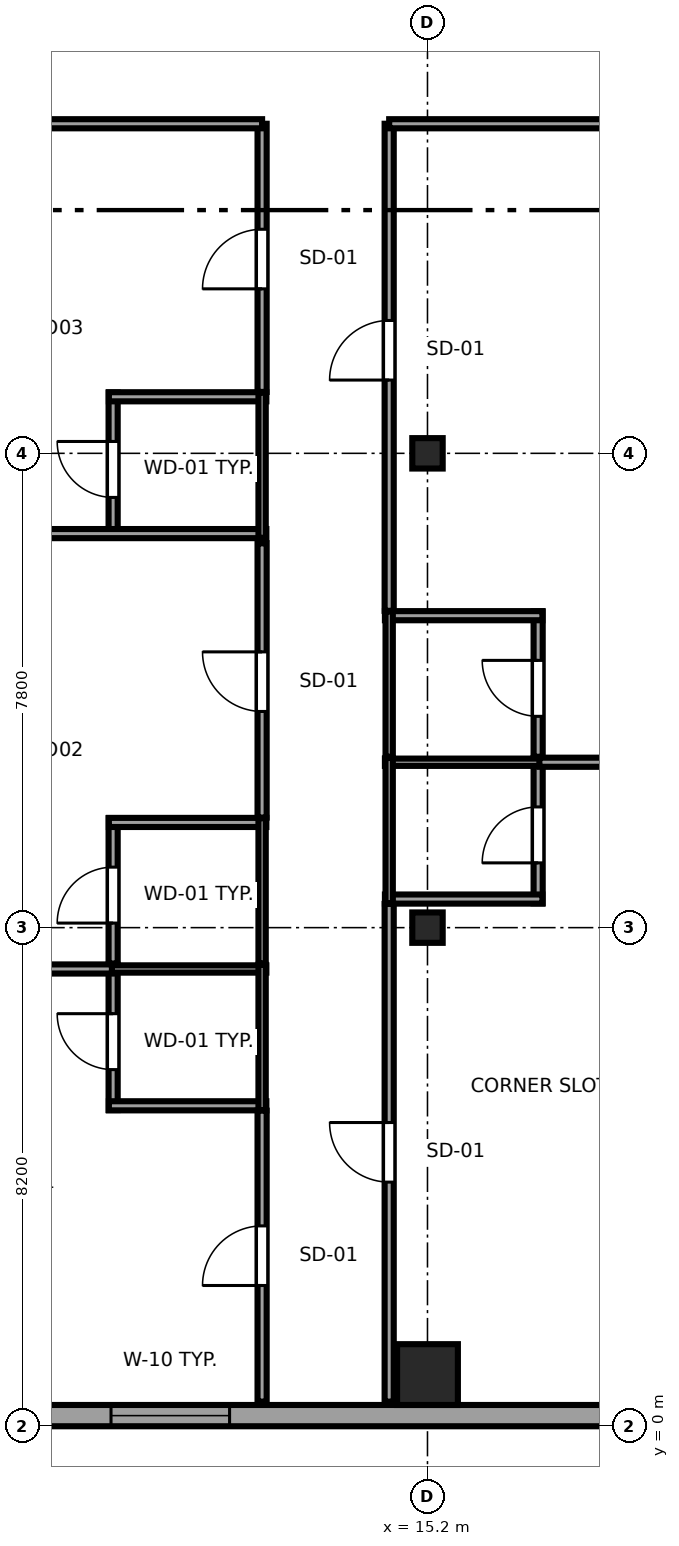
"""IFC4 building model, lengths in metres.
Left out: names, types, materials, properties, quantities, classifications, styles, units other than length and angle.
Written with IfcOpenShell. Run it as: python <this file> out.ifc"""

import sys

from ifc_helpers import new_model, si_unit, direction, frame, frame_2d, origin, origin_2d, place, context, subcontext, project, spatial, rectangle, i_section, extrude, source, transform, mapped, element, fill, save


model = new_model("IFC4")
c1 = context("Model", 3, precision=1e-05, world=origin(), true_north=direction((0.0, 1.0)))
c2 = subcontext(c1, "Body", "Model", "MODEL_VIEW")
j1 = project(units=[si_unit("LENGTHUNIT", "METRE"), si_unit("PLANEANGLEUNIT", "RADIAN")], contexts=[c1])
p1 = place(None, origin())
s1 = spatial("IfcSite", under=j1, at=p1, CompositionType="ELEMENT")
p2 = place(p1, origin())
s2 = spatial("IfcBuilding", under=s1, at=p2, CompositionType="ELEMENT")
p3 = place(p2, frame((0.0, 0.0, 56.85)))
s3 = spatial("IfcBuildingStorey", under=s2, at=p3, CompositionType="ELEMENT", Elevation=56.85)
m1 = source(origin(), c2, "Body", "SweptSolid", [
    extrude(rectangle(XDim=1.0, YDim=1.0, at=origin_2d()), origin(), (0.0, 0.0, 1.0), 3.55),
])
p4 = place(p3, frame((15.2, 0.85, 0.0), z_axis=(0.0, 0.0, 1.0), x_axis=(1.0, 0.0, 0.0)))
e1 = element("IfcColumn", 1, at=p4, inside=s3, PredefinedType="COLUMN", context=c2, shape_type="MappedRepresentation", body=[
    mapped(m1, transform((0.0, 0.0, 0.0), x_axis=(1.0, 0.0, 0.0), y_axis=(0.0, 1.0, 0.0), z_axis=(0.0, 0.0, 1.0), scale=1.0)),
])
m2 = source(origin(), c2, "Body", "SweptSolid", [
    extrude(i_section(OverallWidth=0.5, OverallDepth=0.5, WebThickness=0.028, FlangeThickness=0.045, at=origin_2d()), origin(), (0.0, 0.0, 1.0), 3.55),
])
for number, where, z_axis, x_axis in (
    (2, (15.2, 8.2, 0.0), (0.0, 0.0, 1.0), (1.0, 0.0, 0.0)),
    (3, (15.2, 16.0, 0.0), (0.0, 0.0, 1.0), (1.0, 0.0, 0.0)),
):
    element("IfcColumn", number, at=place(p3, frame(where, z_axis=z_axis, x_axis=x_axis)), inside=s3, PredefinedType="COLUMN", context=c2, shape_type="MappedRepresentation", body=[
        mapped(m2, transform((0.0, 0.0, 0.0), x_axis=(1.0, 0.0, 0.0), y_axis=(0.0, 1.0, 0.0), z_axis=(0.0, 0.0, 1.0), scale=1.0)),
    ])
p5 = place(p3, frame((4.617, 0.175, 0.0), z_axis=(0.0, 0.0, 1.0), x_axis=(1.0, 0.0, 0.0)))
e4 = element("IfcWall", 4, at=p5, inside=s3, PredefinedType="SOLIDWALL", context=c2, shape_type="SweptSolid", body=[
    extrude(rectangle(XDim=18.008, YDim=0.35, at=frame_2d((9.004, 0.0))), origin(), (0.0, 0.0, 1.0), 3.37),
])
p6 = place(p5, frame((5.378, 0.0, 0.68)))
e5 = element("IfcOpeningElement", 5, at=p6, cuts=e4, PredefinedType="OPENING", context=c2, shape_type="SweptSolid", body=[
    extrude(rectangle(XDim=1.95, YDim=1.82, at=frame_2d((0.975, 0.91))), frame((0.0, 0.185, 0.0), z_axis=(0.0, -1.0, 0.0), x_axis=(1.0, 0.0, 0.0)), (0.0, 0.0, 1.0), 0.37),
])
p7 = place(p5, frame((14.332, 0.0, 0.68)))
e6 = element("IfcOpeningElement", 6, at=p7, cuts=e4, PredefinedType="OPENING", context=c2, shape_type="SweptSolid", body=[
    extrude(rectangle(XDim=1.95, YDim=1.82, at=frame_2d((0.975, 0.91))), frame((0.0, 0.185, 0.0), z_axis=(0.0, -1.0, 0.0), x_axis=(1.0, 0.0, 0.0)), (0.0, 0.0, 1.0), 0.37),
])
p8 = place(p3, frame((10.03, 5.2, 0.0), z_axis=(0.0, 0.0, 1.0), x_axis=(0.0, 1.0, 0.0)))
e7 = element("IfcWall", 7, at=p8, inside=s3, PredefinedType="PARTITIONING", context=c2, shape_type="SweptSolid", body=[
    extrude(rectangle(XDim=2.39, YDim=0.15, at=frame_2d((1.195, 0.0))), origin(), (0.0, 0.0, 1.0), 3.37),
])
p9 = place(p8, frame((0.665, 0.0, 0.0)))
e8 = element("IfcOpeningElement", 8, at=p9, cuts=e7, PredefinedType="OPENING", context=c2, shape_type="SweptSolid", body=[
    extrude(rectangle(XDim=0.92, YDim=2.01, at=frame_2d((0.46, 1.005))), frame((0.0, 0.085, 0.0), z_axis=(0.0, -1.0, 0.0), x_axis=(1.0, 0.0, 0.0)), (0.0, 0.0, 1.0), 0.17),
])
p10 = place(p3, frame((9.96, 5.27, 0.0), z_axis=(0.0, 0.0, 1.0), x_axis=(1.0, 0.0, 0.0)))
e9 = element("IfcWall", 9, at=p10, inside=s3, PredefinedType="PARTITIONING", context=c2, shape_type="SweptSolid", body=[
    extrude(rectangle(XDim=2.59, YDim=0.15, at=frame_2d((1.295, 0.0))), origin(), (0.0, 0.0, 1.0), 3.37),
])
p11 = place(p3, frame((9.96, 7.52, 0.0), z_axis=(0.0, 0.0, 1.0), x_axis=(1.0, 0.0, 0.0)))
e10 = element("IfcWall", 10, at=p11, inside=s3, PredefinedType="PLUMBINGWALL", context=c2, shape_type="SweptSolid", body=[
    extrude(rectangle(XDim=2.59, YDim=0.12, at=frame_2d((1.295, 0.0))), origin(), (0.0, 0.0, 1.0), 3.37),
])
p12 = place(p3, frame((12.48, 5.2, 0.0), z_axis=(0.0, 0.0, 1.0), x_axis=(0.0, 1.0, 0.0)))
e11 = element("IfcWall", 11, at=p12, inside=s3, PredefinedType="PLUMBINGWALL", context=c2, shape_type="SweptSolid", body=[
    extrude(rectangle(XDim=2.39, YDim=0.12, at=frame_2d((1.195, 0.0))), origin(), (0.0, 0.0, 1.0), 3.37),
])
p13 = place(p3, frame((10.03, 7.61, 0.0), z_axis=(0.0, 0.0, 1.0), x_axis=(0.0, 1.0, 0.0)))
e12 = element("IfcWall", 12, at=p13, inside=s3, PredefinedType="PARTITIONING", context=c2, shape_type="SweptSolid", body=[
    extrude(rectangle(XDim=2.39, YDim=0.15, at=frame_2d((1.195, 0.0))), origin(), (0.0, 0.0, 1.0), 3.37),
])
p14 = place(p13, frame((0.665, 0.0, 0.0)))
e13 = element("IfcOpeningElement", 13, at=p14, cuts=e12, PredefinedType="OPENING", context=c2, shape_type="SweptSolid", body=[
    extrude(rectangle(XDim=0.92, YDim=2.01, at=frame_2d((0.46, 1.005))), frame((0.0, 0.085, 0.0), z_axis=(0.0, -1.0, 0.0), x_axis=(1.0, 0.0, 0.0)), (0.0, 0.0, 1.0), 0.17),
])
p15 = place(p3, frame((9.96, 9.93, 0.0), z_axis=(0.0, 0.0, 1.0), x_axis=(1.0, 0.0, 0.0)))
e14 = element("IfcWall", 14, at=p15, inside=s3, PredefinedType="PARTITIONING", context=c2, shape_type="SweptSolid", body=[
    extrude(rectangle(XDim=2.59, YDim=0.15, at=frame_2d((1.295, 0.0))), origin(), (0.0, 0.0, 1.0), 3.37),
])
p16 = place(p3, frame((12.48, 7.61, 0.0), z_axis=(0.0, 0.0, 1.0), x_axis=(0.0, 1.0, 0.0)))
e15 = element("IfcWall", 15, at=p16, inside=s3, PredefinedType="PLUMBINGWALL", context=c2, shape_type="SweptSolid", body=[
    extrude(rectangle(XDim=2.39, YDim=0.12, at=frame_2d((1.195, 0.0))), origin(), (0.0, 0.0, 1.0), 3.37),
])
p17 = place(p3, frame((10.03, 14.61, 0.0), z_axis=(0.0, 0.0, 1.0), x_axis=(0.0, 1.0, 0.0)))
e16 = element("IfcWall", 16, at=p17, inside=s3, PredefinedType="PARTITIONING", context=c2, shape_type="SweptSolid", body=[
    extrude(rectangle(XDim=2.39, YDim=0.15, at=frame_2d((1.195, 0.0))), origin(), (0.0, 0.0, 1.0), 3.37),
])
p18 = place(p17, frame((0.665, 0.0, 0.0)))
e17 = element("IfcOpeningElement", 17, at=p18, cuts=e16, PredefinedType="OPENING", context=c2, shape_type="SweptSolid", body=[
    extrude(rectangle(XDim=0.92, YDim=2.01, at=frame_2d((0.46, 1.005))), frame((0.0, 0.085, 0.0), z_axis=(0.0, -1.0, 0.0), x_axis=(1.0, 0.0, 0.0)), (0.0, 0.0, 1.0), 0.17),
])
p19 = place(p3, frame((0.3, 14.68, 0.0), z_axis=(0.0, 0.0, 1.0), x_axis=(1.0, 0.0, 0.0)))
e18 = element("IfcWall", 18, at=p19, inside=s3, PredefinedType="PARTITIONING", context=c2, shape_type="SweptSolid", body=[
    extrude(rectangle(XDim=12.25, YDim=0.15, at=frame_2d((6.125, 0.0))), origin(), (0.0, 0.0, 1.0), 3.37),
])
p20 = place(p3, frame((9.96, 16.93, 0.0), z_axis=(0.0, 0.0, 1.0), x_axis=(1.0, 0.0, 0.0)))
e19 = element("IfcWall", 19, at=p20, inside=s3, PredefinedType="PARTITIONING", context=c2, shape_type="SweptSolid", body=[
    extrude(rectangle(XDim=2.59, YDim=0.15, at=frame_2d((1.295, 0.0))), origin(), (0.0, 0.0, 1.0), 3.37),
])
p21 = place(p3, frame((12.48, 14.61, 0.0), z_axis=(0.0, 0.0, 1.0), x_axis=(0.0, 1.0, 0.0)))
e20 = element("IfcWall", 20, at=p21, inside=s3, PredefinedType="PLUMBINGWALL", context=c2, shape_type="SweptSolid", body=[
    extrude(rectangle(XDim=2.39, YDim=0.12, at=frame_2d((1.195, 0.0))), origin(), (0.0, 0.0, 1.0), 3.37),
])
p22 = place(p3, frame((17.02, 8.6, 0.0), z_axis=(0.0, 0.0, 1.0), x_axis=(0.0, 1.0, 0.0)))
e21 = element("IfcWall", 21, at=p22, inside=s3, PredefinedType="PARTITIONING", context=c2, shape_type="SweptSolid", body=[
    extrude(rectangle(XDim=2.39, YDim=0.15, at=frame_2d((1.195, 0.0))), origin(), (0.0, 0.0, 1.0), 3.37),
])
p23 = place(p22, frame((0.665, 0.0, 0.0)))
e22 = element("IfcOpeningElement", 22, at=p23, cuts=e21, PredefinedType="OPENING", context=c2, shape_type="SweptSolid", body=[
    extrude(rectangle(XDim=0.92, YDim=2.01, at=frame_2d((0.46, 1.005))), frame((0.0, 0.085, 0.0), z_axis=(0.0, -1.0, 0.0), x_axis=(1.0, 0.0, 0.0)), (0.0, 0.0, 1.0), 0.17),
])
p24 = place(p3, frame((14.5, 8.67, 0.0), z_axis=(0.0, 0.0, 1.0), x_axis=(1.0, 0.0, 0.0)))
e23 = element("IfcWall", 23, at=p24, inside=s3, PredefinedType="PARTITIONING", context=c2, shape_type="SweptSolid", body=[
    extrude(rectangle(XDim=2.59, YDim=0.15, at=frame_2d((1.295, 0.0))), origin(), (0.0, 0.0, 1.0), 3.37),
])
p25 = place(p3, frame((14.5, 10.92, 0.0), z_axis=(0.0, 0.0, 1.0), x_axis=(1.0, 0.0, 0.0)))
e24 = element("IfcWall", 24, at=p25, inside=s3, PredefinedType="PLUMBINGWALL", context=c2, shape_type="SweptSolid", body=[
    extrude(rectangle(XDim=2.59, YDim=0.12, at=frame_2d((1.295, 0.0))), origin(), (0.0, 0.0, 1.0), 3.37),
])
p26 = place(p3, frame((14.57, 8.6, 0.0), z_axis=(0.0, 0.0, 1.0), x_axis=(0.0, 1.0, 0.0)))
e25 = element("IfcWall", 25, at=p26, inside=s3, PredefinedType="PLUMBINGWALL", context=c2, shape_type="SweptSolid", body=[
    extrude(rectangle(XDim=2.39, YDim=0.12, at=frame_2d((1.195, 0.0))), origin(), (0.0, 0.0, 1.0), 3.37),
])
p27 = place(p3, frame((17.02, 11.01, 0.0), z_axis=(0.0, 0.0, 1.0), x_axis=(0.0, 1.0, 0.0)))
e26 = element("IfcWall", 26, at=p27, inside=s3, PredefinedType="PARTITIONING", context=c2, shape_type="SweptSolid", body=[
    extrude(rectangle(XDim=2.39, YDim=0.15, at=frame_2d((1.195, 0.0))), origin(), (0.0, 0.0, 1.0), 3.37),
])
p28 = place(p27, frame((0.665, 0.0, 0.0)))
e27 = element("IfcOpeningElement", 27, at=p28, cuts=e26, PredefinedType="OPENING", context=c2, shape_type="SweptSolid", body=[
    extrude(rectangle(XDim=0.92, YDim=2.01, at=frame_2d((0.46, 1.005))), frame((0.0, 0.085, 0.0), z_axis=(0.0, -1.0, 0.0), x_axis=(1.0, 0.0, 0.0)), (0.0, 0.0, 1.0), 0.17),
])
p29 = place(p3, frame((14.5, 13.33, 0.0), z_axis=(0.0, 0.0, 1.0), x_axis=(1.0, 0.0, 0.0)))
e28 = element("IfcWall", 28, at=p29, inside=s3, PredefinedType="PARTITIONING", context=c2, shape_type="SweptSolid", body=[
    extrude(rectangle(XDim=2.59, YDim=0.15, at=frame_2d((1.295, 0.0))), origin(), (0.0, 0.0, 1.0), 3.37),
])
p30 = place(p3, frame((14.57, 11.01, 0.0), z_axis=(0.0, 0.0, 1.0), x_axis=(0.0, 1.0, 0.0)))
e29 = element("IfcWall", 29, at=p30, inside=s3, PredefinedType="PLUMBINGWALL", context=c2, shape_type="SweptSolid", body=[
    extrude(rectangle(XDim=2.39, YDim=0.12, at=frame_2d((1.195, 0.0))), origin(), (0.0, 0.0, 1.0), 3.37),
])
p31 = place(p3, frame((12.48, 0.405, 0.0), z_axis=(0.0, 0.0, 1.0), x_axis=(0.0, 1.0, 0.0)))
e30 = element("IfcWall", 30, at=p31, inside=s3, PredefinedType="PARTITIONING", context=c2, shape_type="SweptSolid", body=[
    extrude(rectangle(XDim=4.785, YDim=0.15, at=frame_2d((2.393, 0.0))), origin(), (0.0, 0.0, 1.0), 3.37),
])
p32 = place(p31, frame((1.91, 0.0, 0.0)))
e31 = element("IfcOpeningElement", 31, at=p32, cuts=e30, PredefinedType="OPENING", context=c2, shape_type="SweptSolid", body=[
    extrude(rectangle(XDim=0.98, YDim=2.12, at=frame_2d((0.49, 1.06))), frame((0.0, 0.085, 0.0), z_axis=(0.0, -1.0, 0.0), x_axis=(1.0, 0.0, 0.0)), (0.0, 0.0, 1.0), 0.17),
])
p33 = place(p3, frame((0.3, 7.52, 0.0), z_axis=(0.0, 0.0, 1.0), x_axis=(1.0, 0.0, 0.0)))
e32 = element("IfcWall", 32, at=p33, inside=s3, PredefinedType="PARTITIONING", context=c2, shape_type="SweptSolid", body=[
    extrude(rectangle(XDim=9.71, YDim=0.15, at=frame_2d((4.855, 0.0))), origin(), (0.0, 0.0, 1.0), 3.37),
])
p34 = place(p3, frame((12.48, 10.01, 0.0), z_axis=(0.0, 0.0, 1.0), x_axis=(0.0, 1.0, 0.0)))
e33 = element("IfcWall", 33, at=p34, inside=s3, PredefinedType="PARTITIONING", context=c2, shape_type="SweptSolid", body=[
    extrude(rectangle(XDim=4.51, YDim=0.15, at=frame_2d((2.255, 0.0))), origin(), (0.0, 0.0, 1.0), 3.37),
])
p35 = place(p34, frame((1.745, 0.0, 0.0)))
e34 = element("IfcOpeningElement", 34, at=p35, cuts=e33, PredefinedType="OPENING", context=c2, shape_type="SweptSolid", body=[
    extrude(rectangle(XDim=0.98, YDim=2.12, at=frame_2d((0.49, 1.06))), frame((0.0, 0.085, 0.0), z_axis=(0.0, -1.0, 0.0), x_axis=(1.0, 0.0, 0.0)), (0.0, 0.0, 1.0), 0.17),
])
p36 = place(p3, frame((12.48, 17.01, 0.0), z_axis=(0.0, 0.0, 1.0), x_axis=(0.0, 1.0, 0.0)))
e35 = element("IfcWall", 35, at=p36, inside=s3, PredefinedType="PARTITIONING", context=c2, shape_type="SweptSolid", body=[
    extrude(rectangle(XDim=4.41, YDim=0.15, at=frame_2d((2.205, 0.0))), origin(), (0.0, 0.0, 1.0), 3.37),
])
p37 = place(p36, frame((1.695, 0.0, 0.0)))
e36 = element("IfcOpeningElement", 36, at=p37, cuts=e35, PredefinedType="OPENING", context=c2, shape_type="SweptSolid", body=[
    extrude(rectangle(XDim=0.98, YDim=2.12, at=frame_2d((0.49, 1.06))), frame((0.0, 0.085, 0.0), z_axis=(0.0, -1.0, 0.0), x_axis=(1.0, 0.0, 0.0)), (0.0, 0.0, 1.0), 0.17),
])
p38 = place(p3, frame((0.3, 21.42, 0.0), z_axis=(0.0, 0.0, 1.0), x_axis=(1.0, 0.0, 0.0)))
e37 = element("IfcWall", 37, at=p38, inside=s3, PredefinedType="PARTITIONING", context=c2, shape_type="SweptSolid", body=[
    extrude(rectangle(XDim=12.18, YDim=0.15, at=frame_2d((6.09, 0.0))), origin(), (0.0, 0.0, 1.0), 3.37),
])
p39 = place(p3, frame((14.57, 0.405, 0.0), z_axis=(0.0, 0.0, 1.0), x_axis=(0.0, 1.0, 0.0)))
e38 = element("IfcWall", 38, at=p39, inside=s3, PredefinedType="PARTITIONING", context=c2, shape_type="SweptSolid", body=[
    extrude(rectangle(XDim=8.185, YDim=0.15, at=frame_2d((4.093, 0.0))), origin(), (0.0, 0.0, 1.0), 3.37),
])
p40 = place(p39, frame((3.61, 0.0, 0.0)))
e39 = element("IfcOpeningElement", 39, at=p40, cuts=e38, PredefinedType="OPENING", context=c2, shape_type="SweptSolid", body=[
    extrude(rectangle(XDim=0.98, YDim=2.12, at=frame_2d((0.49, 1.06))), frame((0.0, 0.085, 0.0), z_axis=(0.0, -1.0, 0.0), x_axis=(1.0, 0.0, 0.0)), (0.0, 0.0, 1.0), 0.17),
])
p41 = place(p3, frame((17.04, 10.92, 0.0), z_axis=(0.0, 0.0, 1.0), x_axis=(1.0, 0.0, 0.0)))
e40 = element("IfcWall", 40, at=p41, inside=s3, PredefinedType="PARTITIONING", context=c2, shape_type="SweptSolid", body=[
    extrude(rectangle(XDim=5.31, YDim=0.15, at=frame_2d((2.655, 0.0))), origin(), (0.0, 0.0, 1.0), 3.37),
])
p42 = place(p3, frame((14.57, 13.41, 0.0), z_axis=(0.0, 0.0, 1.0), x_axis=(0.0, 1.0, 0.0)))
e41 = element("IfcWall", 41, at=p42, inside=s3, PredefinedType="PARTITIONING", context=c2, shape_type="SweptSolid", body=[
    extrude(rectangle(XDim=8.01, YDim=0.15, at=frame_2d((4.005, 0.0))), origin(), (0.0, 0.0, 1.0), 3.37),
])
p43 = place(p42, frame((3.795, 0.0, 0.0)))
e42 = element("IfcOpeningElement", 42, at=p43, cuts=e41, PredefinedType="OPENING", context=c2, shape_type="SweptSolid", body=[
    extrude(rectangle(XDim=0.98, YDim=2.12, at=frame_2d((0.49, 1.06))), frame((0.0, 0.085, 0.0), z_axis=(0.0, -1.0, 0.0), x_axis=(1.0, 0.0, 0.0)), (0.0, 0.0, 1.0), 0.17),
])
p44 = place(p3, frame((14.57, 21.42, 0.0), z_axis=(0.0, 0.0, 1.0), x_axis=(1.0, 0.0, 0.0)))
e43 = element("IfcWall", 43, at=p44, inside=s3, PredefinedType="PARTITIONING", context=c2, shape_type="SweptSolid", body=[
    extrude(rectangle(XDim=7.78, YDim=0.15, at=frame_2d((3.89, 0.0))), origin(), (0.0, 0.0, 1.0), 3.37),
])
m3 = source(origin(), c2, "Body", "SweptSolid", [
    extrude(rectangle(XDim=1.95, YDim=1.82, at=frame_2d((0.975, 0.91))), frame((0.0, 0.09, 0.0), z_axis=(0.0, -1.0, 0.0), x_axis=(1.0, 0.0, 0.0)), (0.0, 0.0, 1.0), 0.06),
])
p45 = place(p6, origin())
e44 = element("IfcWindow", 44, at=p45, inside=s3, PartitioningType="DOUBLE_PANEL_VERTICAL", PredefinedType="WINDOW", context=c2, shape_type="MappedRepresentation", body=[
    mapped(m3, transform((0.0, 0.0, 0.0), x_axis=(1.0, 0.0, 0.0), y_axis=(0.0, 1.0, 0.0), z_axis=(0.0, 0.0, 1.0), scale=1.0)),
])
fill(e5, e44)
m4 = source(origin(), c2, "Body", "SweptSolid", [
    extrude(rectangle(XDim=0.92, YDim=2.01, at=frame_2d((0.46, 1.005))), frame((0.0, 0.025, 0.0), z_axis=(0.0, -1.0, 0.0), x_axis=(1.0, 0.0, 0.0)), (0.0, 0.0, 1.0), 0.05),
])
p46 = place(p9, origin())
e45 = element("IfcDoor", 45, at=p46, inside=s3, OperationType="SINGLE_SWING_RIGHT", PredefinedType="DOOR", context=c2, shape_type="MappedRepresentation", body=[
    mapped(m4, transform((0.0, 0.0, 0.0), x_axis=(1.0, 0.0, 0.0), y_axis=(0.0, 1.0, 0.0), z_axis=(0.0, 0.0, 1.0), scale=1.0)),
])
fill(e8, e45)
p47 = place(p14, origin())
e46 = element("IfcDoor", 46, at=p47, inside=s3, OperationType="SINGLE_SWING_LEFT", PredefinedType="DOOR", context=c2, shape_type="MappedRepresentation", body=[
    mapped(m4, transform((0.0, 0.0, 0.0), x_axis=(1.0, 0.0, 0.0), y_axis=(0.0, 1.0, 0.0), z_axis=(0.0, 0.0, 1.0), scale=1.0)),
])
fill(e13, e46)
p48 = place(p18, origin())
e47 = element("IfcDoor", 47, at=p48, inside=s3, OperationType="SINGLE_SWING_RIGHT", PredefinedType="DOOR", context=c2, shape_type="MappedRepresentation", body=[
    mapped(m4, transform((0.0, 0.0, 0.0), x_axis=(1.0, 0.0, 0.0), y_axis=(0.0, 1.0, 0.0), z_axis=(0.0, 0.0, 1.0), scale=1.0)),
])
fill(e17, e47)
p49 = place(p23, origin())
e48 = element("IfcDoor", 48, at=p49, inside=s3, OperationType="SINGLE_SWING_LEFT", PredefinedType="DOOR", context=c2, shape_type="MappedRepresentation", body=[
    mapped(m4, transform((0.0, 0.0, 0.0), x_axis=(1.0, 0.0, 0.0), y_axis=(0.0, 1.0, 0.0), z_axis=(0.0, 0.0, 1.0), scale=1.0)),
])
fill(e22, e48)
p50 = place(p28, origin())
e49 = element("IfcDoor", 49, at=p50, inside=s3, OperationType="SINGLE_SWING_RIGHT", PredefinedType="DOOR", context=c2, shape_type="MappedRepresentation", body=[
    mapped(m4, transform((0.0, 0.0, 0.0), x_axis=(1.0, 0.0, 0.0), y_axis=(0.0, 1.0, 0.0), z_axis=(0.0, 0.0, 1.0), scale=1.0)),
])
fill(e27, e49)
m5 = source(origin(), c2, "Body", "SweptSolid", [
    extrude(rectangle(XDim=0.98, YDim=2.12, at=frame_2d((0.49, 1.06))), frame((0.0, 0.025, 0.0), z_axis=(0.0, -1.0, 0.0), x_axis=(1.0, 0.0, 0.0)), (0.0, 0.0, 1.0), 0.05),
])
p51 = place(p32, origin())
e50 = element("IfcDoor", 50, at=p51, inside=s3, OperationType="SINGLE_SWING_LEFT", PredefinedType="DOOR", context=c2, shape_type="MappedRepresentation", body=[
    mapped(m5, transform((0.0, 0.0, 0.0), x_axis=(1.0, 0.0, 0.0), y_axis=(0.0, 1.0, 0.0), z_axis=(0.0, 0.0, 1.0), scale=1.0)),
])
fill(e31, e50)
p52 = place(p35, origin())
e51 = element("IfcDoor", 51, at=p52, inside=s3, OperationType="SINGLE_SWING_RIGHT", PredefinedType="DOOR", context=c2, shape_type="MappedRepresentation", body=[
    mapped(m5, transform((0.0, 0.0, 0.0), x_axis=(1.0, 0.0, 0.0), y_axis=(0.0, 1.0, 0.0), z_axis=(0.0, 0.0, 1.0), scale=1.0)),
])
fill(e34, e51)
p53 = place(p37, origin())
e52 = element("IfcDoor", 52, at=p53, inside=s3, OperationType="SINGLE_SWING_LEFT", PredefinedType="DOOR", context=c2, shape_type="MappedRepresentation", body=[
    mapped(m5, transform((0.0, 0.0, 0.0), x_axis=(1.0, 0.0, 0.0), y_axis=(0.0, 1.0, 0.0), z_axis=(0.0, 0.0, 1.0), scale=1.0)),
])
fill(e36, e52)
p54 = place(p40, origin())
e53 = element("IfcDoor", 53, at=p54, inside=s3, OperationType="SINGLE_SWING_RIGHT", PredefinedType="DOOR", context=c2, shape_type="MappedRepresentation", body=[
    mapped(m5, transform((0.0, 0.0, 0.0), x_axis=(1.0, 0.0, 0.0), y_axis=(0.0, 1.0, 0.0), z_axis=(0.0, 0.0, 1.0), scale=1.0)),
])
fill(e39, e53)
p55 = place(p43, origin())
e54 = element("IfcDoor", 54, at=p55, inside=s3, OperationType="SINGLE_SWING_LEFT", PredefinedType="DOOR", context=c2, shape_type="MappedRepresentation", body=[
    mapped(m5, transform((0.0, 0.0, 0.0), x_axis=(1.0, 0.0, 0.0), y_axis=(0.0, 1.0, 0.0), z_axis=(0.0, 0.0, 1.0), scale=1.0)),
])
fill(e42, e54)
save(model, sys.argv[1])
